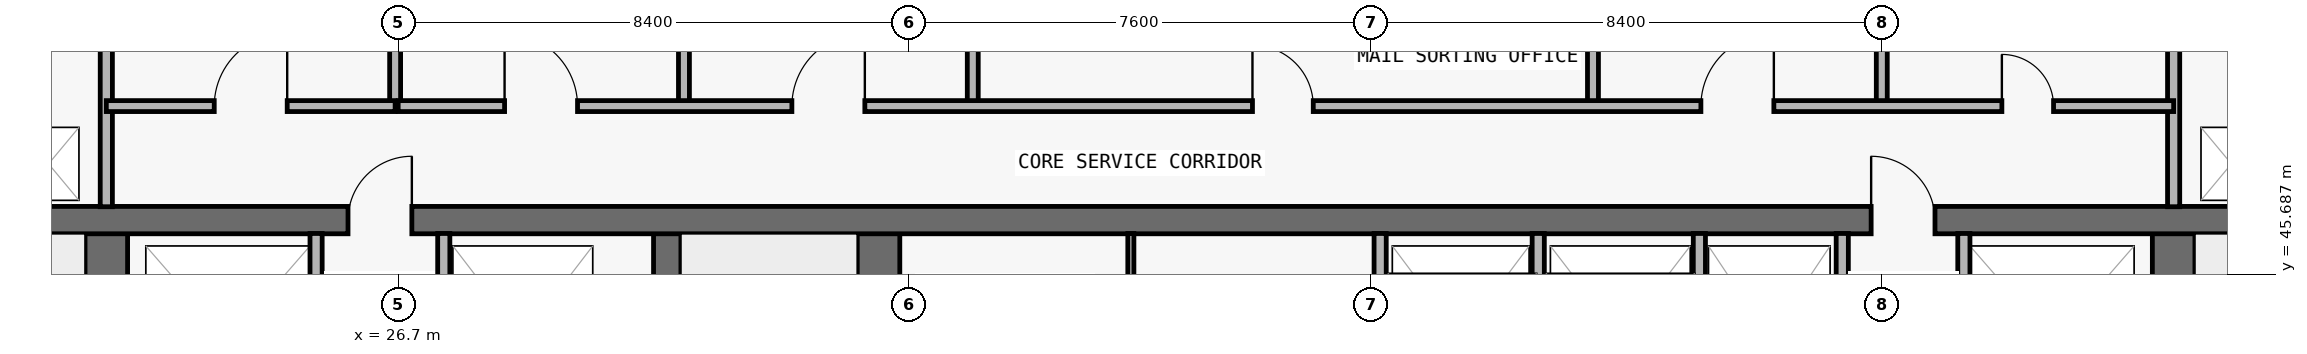
"""IFC4 building model, lengths in metres.
Left out: names, types, materials, properties, quantities, classifications, styles, units other than length and angle.
Written with IfcOpenShell. Run it as: python <this file> out.ifc"""

import sys

from ifc_helpers import new_model, si_unit, direction, frame, frame_2d, origin, place, context, subcontext, project, spatial, rectangle, extrude, element, fill, save


model = new_model("IFC4")
c1 = context("Model", 3, precision=1e-05, world=origin(), true_north=direction((0.0, 1.0)))
c2 = subcontext(c1, "Body", "Model", "MODEL_VIEW")
j1 = project(units=[si_unit("LENGTHUNIT", "METRE"), si_unit("PLANEANGLEUNIT", "RADIAN")], contexts=[c1])
p1 = place(None, origin())
s1 = spatial("IfcSite", under=j1, at=p1, CompositionType="ELEMENT")
p2 = place(p1, origin())
s2 = spatial("IfcBuilding", under=s1, at=p2, CompositionType="ELEMENT")
p3 = place(p2, frame((0.0, 0.0, 109.2)))
s3 = spatial("IfcBuildingStorey", under=s2, at=p3, CompositionType="ELEMENT", Elevation=109.2)
p4 = place(p3, frame((21.9, 36.95, 0.0), z_axis=(0.0, 0.0, 1.0), x_axis=(0.0, 1.0, 0.0)))
e1 = element("IfcWall", 1, at=p4, inside=s3, PredefinedType="SHEAR", context=c2, shape_type="SweptSolid", body=[
    extrude(rectangle(XDim=9.625, YDim=0.7, at=frame_2d((4.812, 0.0))), origin(), (0.0, 0.0, 1.0), 3.05),
])
p5 = place(p4, frame((0.6, 0.0, 0.0)))
e2 = element("IfcOpeningElement", 2, at=p5, cuts=e1, PredefinedType="OPENING", context=c2, shape_type="SweptSolid", body=[
    extrude(rectangle(XDim=1.1, YDim=2.15, at=frame_2d((0.55, 1.075))), frame((0.0, 0.36, 0.0), z_axis=(0.0, -1.0, 0.0), x_axis=(1.0, 0.0, 0.0)), (0.0, 0.0, 1.0), 0.72),
])
p6 = place(p3, frame((55.9, 36.95, 0.0), z_axis=(0.0, 0.0, 1.0), x_axis=(0.0, 1.0, 0.0)))
e3 = element("IfcWall", 3, at=p6, inside=s3, PredefinedType="SHEAR", context=c2, shape_type="SweptSolid", body=[
    extrude(rectangle(XDim=9.625, YDim=0.7, at=frame_2d((4.812, 0.0))), origin(), (0.0, 0.0, 1.0), 3.05),
])
p7 = place(p6, frame((0.6, 0.0, 0.0)))
e4 = element("IfcOpeningElement", 4, at=p7, cuts=e3, PredefinedType="OPENING", context=c2, shape_type="SweptSolid", body=[
    extrude(rectangle(XDim=1.1, YDim=2.15, at=frame_2d((0.55, 1.075))), frame((0.0, 0.36, 0.0), z_axis=(0.0, -1.0, 0.0), x_axis=(1.0, 0.0, 0.0)), (0.0, 0.0, 1.0), 0.72),
])
p8 = place(p3, frame((31.125, 36.95, 0.0), z_axis=(0.0, 0.0, 1.0), x_axis=(0.0, 1.0, 0.0)))
e5 = element("IfcWall", 5, at=p8, inside=s3, PredefinedType="SHEAR", context=c2, shape_type="SweptSolid", body=[
    extrude(rectangle(XDim=9.625, YDim=0.45, at=frame_2d((4.812, 0.0))), origin(), (0.0, 0.0, 1.0), 3.05),
])
p9 = place(p3, frame((34.6, 36.95, 0.0), z_axis=(0.0, 0.0, 1.0), x_axis=(0.0, 1.0, 0.0)))
e6 = element("IfcWall", 6, at=p9, inside=s3, PredefinedType="SHEAR", context=c2, shape_type="SweptSolid", body=[
    extrude(rectangle(XDim=9.625, YDim=0.7, at=frame_2d((4.812, 0.0))), origin(), (0.0, 0.0, 1.0), 3.05),
])
p10 = place(p3, frame((18.25, 46.575, 0.0), z_axis=(0.0, 0.0, 1.0), x_axis=(1.0, 0.0, 0.0)))
e7 = element("IfcWall", 7, at=p10, inside=s3, PredefinedType="SHEAR", context=c2, shape_type="SweptSolid", body=[
    extrude(rectangle(XDim=41.3, YDim=0.45, at=frame_2d((20.65, 0.0))), origin(), (0.0, 0.0, 1.0), 3.05),
])
p11 = place(p10, frame((7.625, 0.0, 0.0)))
e8 = element("IfcOpeningElement", 8, at=p11, cuts=e7, PredefinedType="OPENING", context=c2, shape_type="SweptSolid", body=[
    extrude(rectangle(XDim=1.05, YDim=2.15, at=frame_2d((0.525, 1.075))), frame((0.0, 0.235, 0.0), z_axis=(0.0, -1.0, 0.0), x_axis=(1.0, 0.0, 0.0)), (0.0, 0.0, 1.0), 0.47),
])
p12 = place(p10, frame((32.675, 0.0, 0.0)))
e9 = element("IfcOpeningElement", 9, at=p12, cuts=e7, PredefinedType="OPENING", context=c2, shape_type="SweptSolid", body=[
    extrude(rectangle(XDim=1.05, YDim=2.15, at=frame_2d((0.525, 1.075))), frame((0.0, 0.235, 0.0), z_axis=(0.0, -1.0, 0.0), x_axis=(1.0, 0.0, 0.0)), (0.0, 0.0, 1.0), 0.47),
])
p13 = place(p3, frame((21.9, 46.795, 0.0), z_axis=(0.0, 0.0, 1.0), x_axis=(0.0, 1.0, 0.0)))
e10 = element("IfcWall", 10, at=p13, inside=s3, PredefinedType="PARTITIONING", context=c2, shape_type="SweptSolid", body=[
    extrude(rectangle(XDim=3.16, YDim=0.2, at=frame_2d((1.58, 0.0))), origin(), (0.0, 0.0, 1.0), 3.05),
])
p14 = place(p3, frame((25.35, 43.17, 0.0), z_axis=(0.0, 0.0, 1.0), x_axis=(0.0, 1.0, 0.0)))
e11 = element("IfcWall", 11, at=p14, inside=s3, PredefinedType="PARTITIONING", context=c2, shape_type="SweptSolid", body=[
    extrude(rectangle(XDim=3.185, YDim=0.2, at=frame_2d((1.593, 0.0))), origin(), (0.0, 0.0, 1.0), 3.05),
])
p15 = place(p3, frame((26.65, 48.45, 0.0), z_axis=(0.0, 0.0, 1.0), x_axis=(0.0, 1.0, 0.0)))
e12 = element("IfcWall", 12, at=p15, inside=s3, PredefinedType="PARTITIONING", context=c2, shape_type="SweptSolid", body=[
    extrude(rectangle(XDim=1.505, YDim=0.18, at=frame_2d((0.752, 0.0))), origin(), (0.0, 0.0, 1.0), 3.05),
])
p16 = place(p3, frame((27.45, 43.17, 0.0), z_axis=(0.0, 0.0, 1.0), x_axis=(0.0, 1.0, 0.0)))
e13 = element("IfcWall", 13, at=p16, inside=s3, PredefinedType="PARTITIONING", context=c2, shape_type="SweptSolid", body=[
    extrude(rectangle(XDim=3.185, YDim=0.2, at=frame_2d((1.593, 0.0))), origin(), (0.0, 0.0, 1.0), 3.05),
])
for number, where, z_axis, x_axis in (
    (14, (31.4, 48.45, 0.0), (0.0, 0.0, 1.0), (0.0, 1.0, 0.0)),
    (15, (36.15, 48.45, 0.0), (0.0, 0.0, 1.0), (0.0, 1.0, 0.0)),
):
    element("IfcWall", number, at=place(p3, frame(where, z_axis=z_axis, x_axis=x_axis)), inside=s3, PredefinedType="PARTITIONING", context=c2, shape_type="SweptSolid", body=[
        extrude(rectangle(XDim=1.505, YDim=0.18, at=frame_2d((0.752, 0.0))), origin(), (0.0, 0.0, 1.0), 3.05),
    ])
p17 = place(p3, frame((38.75, 43.17, 0.0), z_axis=(0.0, 0.0, 1.0), x_axis=(0.0, 1.0, 0.0)))
e16 = element("IfcWall", 16, at=p17, inside=s3, PredefinedType="MOVABLE", context=c2, shape_type="SweptSolid", body=[
    extrude(rectangle(XDim=3.185, YDim=0.1, at=frame_2d((1.593, 0.0))), origin(), (0.0, 0.0, 1.0), 3.05),
])
for number, where, z_axis, x_axis in (
    (17, (42.85, 43.17, 0.0), (0.0, 0.0, 1.0), (0.0, 1.0, 0.0)),
    (18, (45.45, 43.17, 0.0), (0.0, 0.0, 1.0), (0.0, 1.0, 0.0)),
):
    element("IfcWall", number, at=place(p3, frame(where, z_axis=z_axis, x_axis=x_axis)), inside=s3, PredefinedType="PARTITIONING", context=c2, shape_type="SweptSolid", body=[
        extrude(rectangle(XDim=3.185, YDim=0.2, at=frame_2d((1.593, 0.0))), origin(), (0.0, 0.0, 1.0), 3.05),
    ])
p18 = place(p3, frame((46.35, 48.45, 0.0), z_axis=(0.0, 0.0, 1.0), x_axis=(0.0, 1.0, 0.0)))
e19 = element("IfcWall", 19, at=p18, inside=s3, PredefinedType="PARTITIONING", context=c2, shape_type="SweptSolid", body=[
    extrude(rectangle(XDim=1.505, YDim=0.18, at=frame_2d((0.752, 0.0))), origin(), (0.0, 0.0, 1.0), 3.05),
])
for number, where, z_axis, x_axis in (
    (20, (48.1, 43.17, 0.0), (0.0, 0.0, 1.0), (0.0, 1.0, 0.0)),
    (21, (50.45, 43.17, 0.0), (0.0, 0.0, 1.0), (0.0, 1.0, 0.0)),
):
    element("IfcWall", number, at=place(p3, frame(where, z_axis=z_axis, x_axis=x_axis)), inside=s3, PredefinedType="PARTITIONING", context=c2, shape_type="SweptSolid", body=[
        extrude(rectangle(XDim=3.185, YDim=0.2, at=frame_2d((1.593, 0.0))), origin(), (0.0, 0.0, 1.0), 3.05),
    ])
p19 = place(p3, frame((51.1, 48.45, 0.0), z_axis=(0.0, 0.0, 1.0), x_axis=(0.0, 1.0, 0.0)))
e22 = element("IfcWall", 22, at=p19, inside=s3, PredefinedType="PARTITIONING", context=c2, shape_type="SweptSolid", body=[
    extrude(rectangle(XDim=1.505, YDim=0.18, at=frame_2d((0.752, 0.0))), origin(), (0.0, 0.0, 1.0), 3.05),
])
p20 = place(p3, frame((52.45, 43.17, 0.0), z_axis=(0.0, 0.0, 1.0), x_axis=(0.0, 1.0, 0.0)))
e23 = element("IfcWall", 23, at=p20, inside=s3, PredefinedType="PARTITIONING", context=c2, shape_type="SweptSolid", body=[
    extrude(rectangle(XDim=3.185, YDim=0.2, at=frame_2d((1.593, 0.0))), origin(), (0.0, 0.0, 1.0), 3.05),
])
p21 = place(p3, frame((55.9, 46.795, 0.0), z_axis=(0.0, 0.0, 1.0), x_axis=(0.0, 1.0, 0.0)))
e24 = element("IfcWall", 24, at=p21, inside=s3, PredefinedType="PARTITIONING", context=c2, shape_type="SweptSolid", body=[
    extrude(rectangle(XDim=3.16, YDim=0.2, at=frame_2d((1.58, 0.0))), origin(), (0.0, 0.0, 1.0), 3.05),
])
p22 = place(p3, frame((21.9, 48.45, 0.0), z_axis=(0.0, 0.0, 1.0), x_axis=(1.0, 0.0, 0.0)))
e25 = element("IfcWall", 25, at=p22, inside=s3, PredefinedType="PARTITIONING", context=c2, shape_type="SweptSolid", body=[
    extrude(rectangle(XDim=4.75, YDim=0.18, at=frame_2d((2.375, 0.0))), origin(), (0.0, 0.0, 1.0), 3.05),
])
p23 = place(p22, frame((1.775, 0.0, 0.0)))
e26 = element("IfcOpeningElement", 26, at=p23, cuts=e25, PredefinedType="OPENING", context=c2, shape_type="SweptSolid", body=[
    extrude(rectangle(XDim=1.2, YDim=2.2, at=frame_2d((0.6, 1.1))), frame((0.0, 0.1, 0.0), z_axis=(0.0, -1.0, 0.0), x_axis=(1.0, 0.0, 0.0)), (0.0, 0.0, 1.0), 0.2),
])
p24 = place(p3, frame((26.7, 48.45, 0.0), z_axis=(0.0, 0.0, 1.0), x_axis=(1.0, 0.0, 0.0)))
e27 = element("IfcWall", 27, at=p24, inside=s3, PredefinedType="PARTITIONING", context=c2, shape_type="SweptSolid", body=[
    extrude(rectangle(XDim=29.2, YDim=0.18, at=frame_2d((14.6, 0.0))), origin(), (0.0, 0.0, 1.0), 3.05),
])
p25 = place(p24, frame((1.75, 0.0, 0.0)))
e28 = element("IfcOpeningElement", 28, at=p25, cuts=e27, PredefinedType="OPENING", context=c2, shape_type="SweptSolid", body=[
    extrude(rectangle(XDim=1.2, YDim=2.2, at=frame_2d((0.6, 1.1))), frame((0.0, 0.1, 0.0), z_axis=(0.0, -1.0, 0.0), x_axis=(1.0, 0.0, 0.0)), (0.0, 0.0, 1.0), 0.2),
])
p26 = place(p24, frame((6.475, 0.0, 0.0)))
e29 = element("IfcOpeningElement", 29, at=p26, cuts=e27, PredefinedType="OPENING", context=c2, shape_type="SweptSolid", body=[
    extrude(rectangle(XDim=1.2, YDim=2.2, at=frame_2d((0.6, 1.1))), frame((0.0, 0.1, 0.0), z_axis=(0.0, -1.0, 0.0), x_axis=(1.0, 0.0, 0.0)), (0.0, 0.0, 1.0), 0.2),
])
p27 = place(p24, frame((14.05, 0.0, 0.0)))
e30 = element("IfcOpeningElement", 30, at=p27, cuts=e27, PredefinedType="OPENING", context=c2, shape_type="SweptSolid", body=[
    extrude(rectangle(XDim=1.0, YDim=2.2, at=frame_2d((0.5, 1.1))), frame((0.0, 0.1, 0.0), z_axis=(0.0, -1.0, 0.0), x_axis=(1.0, 0.0, 0.0)), (0.0, 0.0, 1.0), 0.2),
])
p28 = place(p24, frame((21.425, 0.0, 0.0)))
e31 = element("IfcOpeningElement", 31, at=p28, cuts=e27, PredefinedType="OPENING", context=c2, shape_type="SweptSolid", body=[
    extrude(rectangle(XDim=1.2, YDim=2.2, at=frame_2d((0.6, 1.1))), frame((0.0, 0.1, 0.0), z_axis=(0.0, -1.0, 0.0), x_axis=(1.0, 0.0, 0.0)), (0.0, 0.0, 1.0), 0.2),
])
p29 = place(p24, frame((26.375, 0.0, 0.0)))
e32 = element("IfcOpeningElement", 32, at=p29, cuts=e27, PredefinedType="OPENING", context=c2, shape_type="SweptSolid", body=[
    extrude(rectangle(XDim=0.85, YDim=2.1, at=frame_2d((0.425, 1.05))), frame((0.0, 0.1, 0.0), z_axis=(0.0, -1.0, 0.0), x_axis=(1.0, 0.0, 0.0)), (0.0, 0.0, 1.0), 0.2),
])
p30 = place(p11, origin())
e33 = element("IfcDoor", 33, at=p30, inside=s3, OperationType="SINGLE_SWING_RIGHT", PredefinedType="DOOR", context=c2, shape_type="SweptSolid", body=[
    extrude(rectangle(XDim=1.05, YDim=2.15, at=frame_2d((0.525, 1.075))), frame((0.0, 0.025, 0.0), z_axis=(0.0, -1.0, 0.0), x_axis=(1.0, 0.0, 0.0)), (0.0, 0.0, 1.0), 0.05),
])
fill(e8, e33)
p31 = place(p12, origin())
e34 = element("IfcDoor", 34, at=p31, inside=s3, OperationType="SINGLE_SWING_LEFT", PredefinedType="DOOR", context=c2, shape_type="SweptSolid", body=[
    extrude(rectangle(XDim=1.05, YDim=2.15, at=frame_2d((0.525, 1.075))), frame((0.0, 0.025, 0.0), z_axis=(0.0, -1.0, 0.0), x_axis=(1.0, 0.0, 0.0)), (0.0, 0.0, 1.0), 0.05),
])
fill(e9, e34)
p32 = place(p23, origin())
e35 = element("IfcDoor", 35, at=p32, inside=s3, OperationType="SINGLE_SWING_RIGHT", PredefinedType="DOOR", context=c2, shape_type="SweptSolid", body=[
    extrude(rectangle(XDim=1.2, YDim=2.2, at=frame_2d((0.6, 1.1))), frame((0.0, 0.025, 0.0), z_axis=(0.0, -1.0, 0.0), x_axis=(1.0, 0.0, 0.0)), (0.0, 0.0, 1.0), 0.05),
])
fill(e26, e35)
p33 = place(p25, origin())
e36 = element("IfcDoor", 36, at=p33, inside=s3, OperationType="SINGLE_SWING_LEFT", PredefinedType="DOOR", context=c2, shape_type="SweptSolid", body=[
    extrude(rectangle(XDim=1.2, YDim=2.2, at=frame_2d((0.6, 1.1))), frame((0.0, 0.025, 0.0), z_axis=(0.0, -1.0, 0.0), x_axis=(1.0, 0.0, 0.0)), (0.0, 0.0, 1.0), 0.05),
])
fill(e28, e36)
p34 = place(p26, origin())
e37 = element("IfcDoor", 37, at=p34, inside=s3, OperationType="SINGLE_SWING_RIGHT", PredefinedType="DOOR", context=c2, shape_type="SweptSolid", body=[
    extrude(rectangle(XDim=1.2, YDim=2.2, at=frame_2d((0.6, 1.1))), frame((0.0, 0.025, 0.0), z_axis=(0.0, -1.0, 0.0), x_axis=(1.0, 0.0, 0.0)), (0.0, 0.0, 1.0), 0.05),
])
fill(e29, e37)
p35 = place(p27, origin())
e38 = element("IfcDoor", 38, at=p35, inside=s3, OperationType="SINGLE_SWING_LEFT", PredefinedType="DOOR", context=c2, shape_type="SweptSolid", body=[
    extrude(rectangle(XDim=1.0, YDim=2.2, at=frame_2d((0.5, 1.1))), frame((0.0, 0.025, 0.0), z_axis=(0.0, -1.0, 0.0), x_axis=(1.0, 0.0, 0.0)), (0.0, 0.0, 1.0), 0.05),
])
fill(e30, e38)
p36 = place(p28, origin())
e39 = element("IfcDoor", 39, at=p36, inside=s3, OperationType="SINGLE_SWING_RIGHT", PredefinedType="DOOR", context=c2, shape_type="SweptSolid", body=[
    extrude(rectangle(XDim=1.2, YDim=2.2, at=frame_2d((0.6, 1.1))), frame((0.0, 0.025, 0.0), z_axis=(0.0, -1.0, 0.0), x_axis=(1.0, 0.0, 0.0)), (0.0, 0.0, 1.0), 0.05),
])
fill(e31, e39)
p37 = place(p29, origin())
e40 = element("IfcDoor", 40, at=p37, inside=s3, OperationType="SINGLE_SWING_LEFT", PredefinedType="DOOR", context=c2, shape_type="SweptSolid", body=[
    extrude(rectangle(XDim=0.85, YDim=2.1, at=frame_2d((0.425, 1.05))), frame((0.0, 0.025, 0.0), z_axis=(0.0, -1.0, 0.0), x_axis=(1.0, 0.0, 0.0)), (0.0, 0.0, 1.0), 0.05),
])
fill(e32, e40)
save(model, sys.argv[1])
